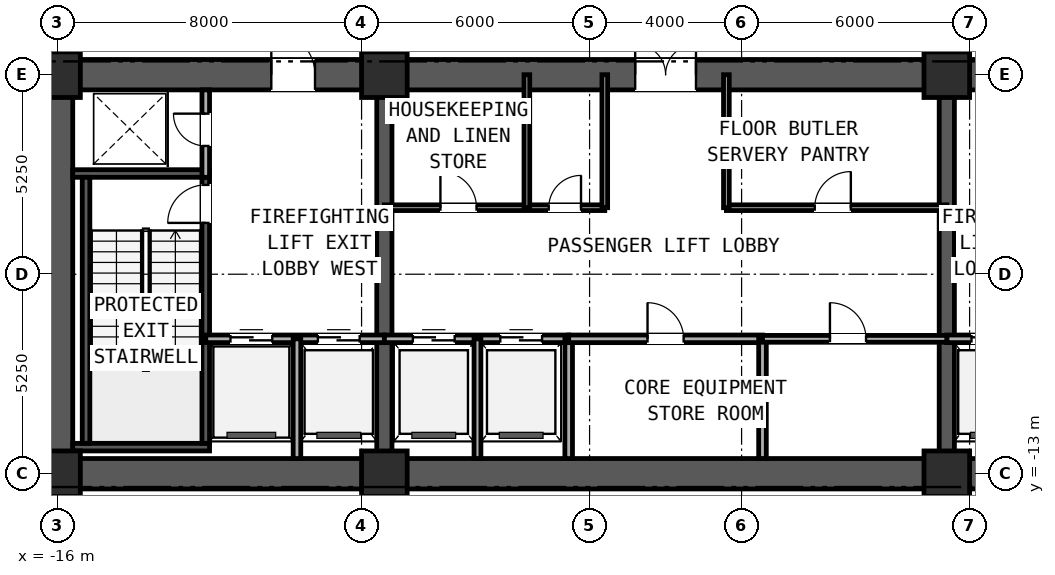
"""IFC4 building model, lengths in metres.
Left out: names, types, materials, properties, quantities, classifications, styles, units other than length and angle.
Written with IfcOpenShell. Run it as: python <this file> out.ifc"""

import sys

from ifc_helpers import new_model, si_unit, direction, frame, frame_2d, origin, origin_2d, place, context, subcontext, project, spatial, rectangle, extrude, element, fill, save


model = new_model("IFC4")
c1 = context("Model", 3, precision=1e-05, world=origin(), true_north=direction((0.0, 1.0)))
c2 = subcontext(c1, "Body", "Model", "MODEL_VIEW")
j1 = project(units=[si_unit("LENGTHUNIT", "METRE"), si_unit("PLANEANGLEUNIT", "RADIAN")], contexts=[c1])
p1 = place(None, origin())
s1 = spatial("IfcSite", under=j1, at=p1, CompositionType="ELEMENT")
p2 = place(p1, origin())
s2 = spatial("IfcBuilding", under=s1, at=p2, CompositionType="ELEMENT")
p3 = place(p2, frame((0.0, 0.0, -5.2)))
s3 = spatial("IfcBuildingStorey", under=s2, at=p3, CompositionType="ELEMENT", Elevation=-5.2)
p4 = place(p3, frame((-16.4, -13.0, 0.0), z_axis=(0.0, 0.0, 1.0), x_axis=(1.0, 0.0, 0.0)))
e1 = element("IfcWall", 1, at=p4, inside=s3, PredefinedType="SHEAR", context=c2, shape_type="SweptSolid", body=[
    extrude(rectangle(XDim=32.8, YDim=0.8, at=frame_2d((16.4, 0.0))), origin(), (0.0, 0.0, 1.0), 4.62),
])
p5 = place(p3, frame((-16.4, -2.5, 0.0), z_axis=(0.0, 0.0, 1.0), x_axis=(1.0, 0.0, 0.0)))
e2 = element("IfcWall", 2, at=p5, inside=s3, PredefinedType="SHEAR", context=c2, shape_type="SweptSolid", body=[
    extrude(rectangle(XDim=32.8, YDim=0.8, at=frame_2d((16.4, 0.0))), origin(), (0.0, 0.0, 1.0), 4.62),
])
p6 = place(p5, frame((6.025, 0.0, 0.0)))
e3 = element("IfcOpeningElement", 3, at=p6, cuts=e2, PredefinedType="OPENING", context=c2, shape_type="SweptSolid", body=[
    extrude(rectangle(XDim=1.15, YDim=2.0, at=frame_2d((0.575, 1.0))), frame((0.0, 0.41, 0.0), z_axis=(0.0, -1.0, 0.0), x_axis=(1.0, 0.0, 0.0)), (0.0, 0.0, 1.0), 0.82),
])
p7 = place(p5, frame((15.6, 0.0, 0.0)))
e4 = element("IfcOpeningElement", 4, at=p7, cuts=e2, PredefinedType="OPENING", context=c2, shape_type="SweptSolid", body=[
    extrude(rectangle(XDim=1.6, YDim=2.0, at=frame_2d((0.8, 1.0))), frame((0.0, 0.41, 0.0), z_axis=(0.0, -1.0, 0.0), x_axis=(1.0, 0.0, 0.0)), (0.0, 0.0, 1.0), 0.82),
])
p8 = place(p5, frame((25.625, 0.0, 0.0)))
e5 = element("IfcOpeningElement", 5, at=p8, cuts=e2, PredefinedType="OPENING", context=c2, shape_type="SweptSolid", body=[
    extrude(rectangle(XDim=1.15, YDim=2.0, at=frame_2d((0.575, 1.0))), frame((0.0, 0.41, 0.0), z_axis=(0.0, -1.0, 0.0), x_axis=(1.0, 0.0, 0.0)), (0.0, 0.0, 1.0), 0.82),
])
p9 = place(p3, frame((-16.0, -12.6, 0.0), z_axis=(0.0, 0.0, 1.0), x_axis=(0.0, 1.0, 0.0)))
e6 = element("IfcWall", 6, at=p9, inside=s3, PredefinedType="SHEAR", context=c2, shape_type="SweptSolid", body=[
    extrude(rectangle(XDim=9.7, YDim=0.8, at=frame_2d((4.85, 0.0))), origin(), (0.0, 0.0, 1.0), 4.62),
])
for number, where, z_axis, x_axis in (
    (7, (-7.4, -12.6, 0.0), (0.0, 0.0, 1.0), (0.0, 1.0, 0.0)),
    (8, (7.4, -12.6, 0.0), (0.0, 0.0, 1.0), (0.0, 1.0, 0.0)),
):
    element("IfcWall", number, at=place(p3, frame(where, z_axis=z_axis, x_axis=x_axis)), inside=s3, PredefinedType="SHEAR", context=c2, shape_type="SweptSolid", body=[
        extrude(rectangle(XDim=9.7, YDim=0.4, at=frame_2d((4.85, 0.0))), origin(), (0.0, 0.0, 1.0), 4.9),
    ])
for number, where, z_axis, x_axis in (
    (9, (-15.6, -12.3, 0.0), (0.0, 0.0, 1.0), (1.0, 0.0, 0.0)),
    (10, (-15.6, -5.1, 0.0), (0.0, 0.0, 1.0), (1.0, 0.0, 0.0)),
):
    element("IfcWall", number, at=place(p3, frame(where, z_axis=z_axis, x_axis=x_axis)), inside=s3, PredefinedType="SOLIDWALL", context=c2, shape_type="SweptSolid", body=[
        extrude(rectangle(XDim=3.6, YDim=0.2, at=frame_2d((1.8, 0.0))), origin(), (0.0, 0.0, 1.0), 4.9),
    ])
p10 = place(p3, frame((-15.25, -12.2, 0.0), z_axis=(0.0, 0.0, 1.0), x_axis=(0.0, 1.0, 0.0)))
e11 = element("IfcWall", 11, at=p10, inside=s3, PredefinedType="SOLIDWALL", context=c2, shape_type="SweptSolid", body=[
    extrude(rectangle(XDim=7.0, YDim=0.2, at=frame_2d((3.5, 0.0))), origin(), (0.0, 0.0, 1.0), 4.9),
])
p11 = place(p3, frame((-12.1, -12.2, 0.0), z_axis=(0.0, 0.0, 1.0), x_axis=(0.0, 1.0, 0.0)))
e12 = element("IfcWall", 12, at=p11, inside=s3, PredefinedType="SOLIDWALL", context=c2, shape_type="SweptSolid", body=[
    extrude(rectangle(XDim=7.0, YDim=0.2, at=frame_2d((3.5, 0.0))), origin(), (0.0, 0.0, 1.0), 4.9),
])
p12 = place(p11, frame((5.8, 0.0, 0.0)))
e13 = element("IfcOpeningElement", 13, at=p12, cuts=e12, PredefinedType="OPENING", context=c2, shape_type="SweptSolid", body=[
    extrude(rectangle(XDim=1.0, YDim=2.1, at=frame_2d((0.5, 1.05))), frame((0.0, 0.11, 0.0), z_axis=(0.0, -1.0, 0.0), x_axis=(1.0, 0.0, 0.0)), (0.0, 0.0, 1.0), 0.22),
])
for number, where, z_axis, x_axis in (
    (14, (-16.0, -13.0, 0.0), (0.0, 0.0, 1.0), (1.0, 0.0, 0.0)),
    (15, (-7.4, -13.0, 0.0), (0.0, 0.0, 1.0), (1.0, 0.0, 0.0)),
    (16, (7.4, -13.0, 0.0), (0.0, 0.0, 1.0), (1.0, 0.0, 0.0)),
    (17, (-16.0, -2.5, 0.0), (0.0, 0.0, 1.0), (1.0, 0.0, 0.0)),
    (18, (-7.4, -2.5, 0.0), (0.0, 0.0, 1.0), (1.0, 0.0, 0.0)),
    (19, (7.4, -2.5, 0.0), (0.0, 0.0, 1.0), (1.0, 0.0, 0.0)),
):
    element("IfcColumn", number, at=place(p3, frame(where, z_axis=z_axis, x_axis=x_axis)), inside=s3, PredefinedType="COLUMN", context=c2, shape_type="SweptSolid", body=[
        extrude(rectangle(XDim=1.2, YDim=1.2, at=origin_2d()), origin(), (0.0, 0.0, 1.0), 5.2),
    ])
p13 = place(p3, frame((-12.1, -5.2, 0.0), z_axis=(0.0, 0.0, 1.0), x_axis=(0.0, 1.0, 0.0)))
e20 = element("IfcWall", 20, at=p13, inside=s3, PredefinedType="PARTITIONING", context=c2, shape_type="SweptSolid", body=[
    extrude(rectangle(XDim=2.3, YDim=0.2, at=frame_2d((1.15, 0.0))), origin(), (0.0, 0.0, 1.0), 4.9),
])
p14 = place(p13, frame((0.825, 0.0, 0.0)))
e21 = element("IfcOpeningElement", 21, at=p14, cuts=e20, PredefinedType="OPENING", context=c2, shape_type="SweptSolid", body=[
    extrude(rectangle(XDim=0.85, YDim=2.05, at=frame_2d((0.425, 1.025))), frame((0.0, 0.11, 0.0), z_axis=(0.0, -1.0, 0.0), x_axis=(1.0, 0.0, 0.0)), (0.0, 0.0, 1.0), 0.22),
])
p15 = place(p3, frame((-12.1, -9.45, 0.0), z_axis=(0.0, 0.0, 1.0), x_axis=(1.0, 0.0, 0.0)))
e22 = element("IfcWall", 22, at=p15, inside=s3, PredefinedType="PARTITIONING", context=c2, shape_type="SweptSolid", body=[
    extrude(rectangle(XDim=4.7, YDim=0.2, at=frame_2d((2.35, 0.0))), origin(), (0.0, 0.0, 1.0), 4.9),
])
p16 = place(p15, frame((0.65, 0.0, 0.0)))
e23 = element("IfcOpeningElement", 23, at=p16, cuts=e22, PredefinedType="OPENING", context=c2, shape_type="SweptSolid", body=[
    extrude(rectangle(XDim=1.1, YDim=2.2, at=frame_2d((0.55, 1.1))), frame((0.0, 0.11, 0.0), z_axis=(0.0, -1.0, 0.0), x_axis=(1.0, 0.0, 0.0)), (0.0, 0.0, 1.0), 0.22),
])
p17 = place(p15, frame((2.95, 0.0, 0.0)))
e24 = element("IfcOpeningElement", 24, at=p17, cuts=e22, PredefinedType="OPENING", context=c2, shape_type="SweptSolid", body=[
    extrude(rectangle(XDim=1.1, YDim=2.2, at=frame_2d((0.55, 1.1))), frame((0.0, 0.11, 0.0), z_axis=(0.0, -1.0, 0.0), x_axis=(1.0, 0.0, 0.0)), (0.0, 0.0, 1.0), 0.22),
])
p18 = place(p3, frame((-9.7, -12.6, 0.0), z_axis=(0.0, 0.0, 1.0), x_axis=(0.0, 1.0, 0.0)))
e25 = element("IfcWall", 25, at=p18, inside=s3, PredefinedType="PARTITIONING", context=c2, shape_type="SweptSolid", body=[
    extrude(rectangle(XDim=3.15, YDim=0.2, at=frame_2d((1.575, 0.0))), origin(), (0.0, 0.0, 1.0), 4.9),
])
p19 = place(p3, frame((7.4, -9.45, 0.0), z_axis=(0.0, 0.0, 1.0), x_axis=(1.0, 0.0, 0.0)))
e26 = element("IfcWall", 26, at=p19, inside=s3, PredefinedType="PARTITIONING", context=c2, shape_type="SweptSolid", body=[
    extrude(rectangle(XDim=4.7, YDim=0.2, at=frame_2d((2.35, 0.0))), origin(), (0.0, 0.0, 1.0), 4.9),
])
p20 = place(p19, frame((2.95, 0.0, 0.0)))
e27 = element("IfcOpeningElement", 27, at=p20, cuts=e26, PredefinedType="OPENING", context=c2, shape_type="SweptSolid", body=[
    extrude(rectangle(XDim=1.1, YDim=2.2, at=frame_2d((0.55, 1.1))), frame((0.0, 0.11, 0.0), z_axis=(0.0, -1.0, 0.0), x_axis=(1.0, 0.0, 0.0)), (0.0, 0.0, 1.0), 0.22),
])
p21 = place(p19, frame((0.65, 0.0, 0.0)))
e28 = element("IfcOpeningElement", 28, at=p21, cuts=e26, PredefinedType="OPENING", context=c2, shape_type="SweptSolid", body=[
    extrude(rectangle(XDim=1.1, YDim=2.2, at=frame_2d((0.55, 1.1))), frame((0.0, 0.11, 0.0), z_axis=(0.0, -1.0, 0.0), x_axis=(1.0, 0.0, 0.0)), (0.0, 0.0, 1.0), 0.22),
])
p22 = place(p3, frame((-7.4, -9.45, 0.0), z_axis=(0.0, 0.0, 1.0), x_axis=(1.0, 0.0, 0.0)))
e29 = element("IfcWall", 29, at=p22, inside=s3, PredefinedType="PARTITIONING", context=c2, shape_type="SweptSolid", body=[
    extrude(rectangle(XDim=4.85, YDim=0.2, at=frame_2d((2.425, 0.0))), origin(), (0.0, 0.0, 1.0), 4.9),
])
p23 = place(p22, frame((0.75, 0.0, 0.0)))
e30 = element("IfcOpeningElement", 30, at=p23, cuts=e29, PredefinedType="OPENING", context=c2, shape_type="SweptSolid", body=[
    extrude(rectangle(XDim=1.1, YDim=2.2, at=frame_2d((0.55, 1.1))), frame((0.0, 0.11, 0.0), z_axis=(0.0, -1.0, 0.0), x_axis=(1.0, 0.0, 0.0)), (0.0, 0.0, 1.0), 0.22),
])
p24 = place(p22, frame((3.05, 0.0, 0.0)))
e31 = element("IfcOpeningElement", 31, at=p24, cuts=e29, PredefinedType="OPENING", context=c2, shape_type="SweptSolid", body=[
    extrude(rectangle(XDim=1.1, YDim=2.2, at=frame_2d((0.55, 1.1))), frame((0.0, 0.11, 0.0), z_axis=(0.0, -1.0, 0.0), x_axis=(1.0, 0.0, 0.0)), (0.0, 0.0, 1.0), 0.22),
])
p25 = place(p3, frame((-4.95, -12.6, 0.0), z_axis=(0.0, 0.0, 1.0), x_axis=(0.0, 1.0, 0.0)))
e32 = element("IfcWall", 32, at=p25, inside=s3, PredefinedType="PARTITIONING", context=c2, shape_type="SweptSolid", body=[
    extrude(rectangle(XDim=3.15, YDim=0.18, at=frame_2d((1.575, 0.0))), origin(), (0.0, 0.0, 1.0), 4.9),
])
p26 = place(p3, frame((-2.55, -12.6, 0.0), z_axis=(0.0, 0.0, 1.0), x_axis=(0.0, 1.0, 0.0)))
e33 = element("IfcWall", 33, at=p26, inside=s3, PredefinedType="PARTITIONING", context=c2, shape_type="SweptSolid", body=[
    extrude(rectangle(XDim=3.15, YDim=0.2, at=frame_2d((1.575, 0.0))), origin(), (0.0, 0.0, 1.0), 4.9),
])
p27 = place(p3, frame((-2.55, -9.45, 0.0), z_axis=(0.0, 0.0, 1.0), x_axis=(1.0, 0.0, 0.0)))
e34 = element("IfcWall", 34, at=p27, inside=s3, PredefinedType="PARTITIONING", context=c2, shape_type="SweptSolid", body=[
    extrude(rectangle(XDim=5.1, YDim=0.2, at=frame_2d((2.55, 0.0))), origin(), (0.0, 0.0, 1.0), 4.9),
])
p28 = place(p27, frame((2.075, 0.0, 0.0)))
e35 = element("IfcOpeningElement", 35, at=p28, cuts=e34, PredefinedType="OPENING", context=c2, shape_type="SweptSolid", body=[
    extrude(rectangle(XDim=0.95, YDim=2.15, at=frame_2d((0.475, 1.075))), frame((0.0, 0.11, 0.0), z_axis=(0.0, -1.0, 0.0), x_axis=(1.0, 0.0, 0.0)), (0.0, 0.0, 1.0), 0.22),
])
p29 = place(p3, frame((2.55, -12.6, 0.0), z_axis=(0.0, 0.0, 1.0), x_axis=(0.0, 1.0, 0.0)))
e36 = element("IfcWall", 36, at=p29, inside=s3, PredefinedType="PARTITIONING", context=c2, shape_type="SweptSolid", body=[
    extrude(rectangle(XDim=3.15, YDim=0.2, at=frame_2d((1.575, 0.0))), origin(), (0.0, 0.0, 1.0), 4.9),
])
p30 = place(p3, frame((2.55, -9.45, 0.0), z_axis=(0.0, 0.0, 1.0), x_axis=(1.0, 0.0, 0.0)))
e37 = element("IfcWall", 37, at=p30, inside=s3, PredefinedType="PARTITIONING", context=c2, shape_type="SweptSolid", body=[
    extrude(rectangle(XDim=4.85, YDim=0.18, at=frame_2d((2.425, 0.0))), origin(), (0.0, 0.0, 1.0), 4.9),
])
p31 = place(p30, frame((1.775, 0.0, 0.0)))
e38 = element("IfcOpeningElement", 38, at=p31, cuts=e37, PredefinedType="OPENING", context=c2, shape_type="SweptSolid", body=[
    extrude(rectangle(XDim=0.95, YDim=2.15, at=frame_2d((0.475, 1.075))), frame((0.0, 0.1, 0.0), z_axis=(0.0, -1.0, 0.0), x_axis=(1.0, 0.0, 0.0)), (0.0, 0.0, 1.0), 0.2),
])
p32 = place(p3, frame((-7.4, -6.0, 0.0), z_axis=(0.0, 0.0, 1.0), x_axis=(1.0, 0.0, 0.0)))
e39 = element("IfcWall", 39, at=p32, inside=s3, PredefinedType="PARTITIONING", context=c2, shape_type="SweptSolid", body=[
    extrude(rectangle(XDim=5.8, YDim=0.15, at=frame_2d((2.9, 0.0))), origin(), (0.0, 0.0, 1.0), 4.9),
])
p33 = place(p32, frame((1.475, 0.0, 0.0)))
e40 = element("IfcOpeningElement", 40, at=p33, cuts=e39, PredefinedType="OPENING", context=c2, shape_type="SweptSolid", body=[
    extrude(rectangle(XDim=0.95, YDim=2.15, at=frame_2d((0.475, 1.075))), frame((0.0, 0.085, 0.0), z_axis=(0.0, -1.0, 0.0), x_axis=(1.0, 0.0, 0.0)), (0.0, 0.0, 1.0), 0.17),
])
p34 = place(p32, frame((4.325, 0.0, 0.0)))
e41 = element("IfcOpeningElement", 41, at=p34, cuts=e39, PredefinedType="OPENING", context=c2, shape_type="SweptSolid", body=[
    extrude(rectangle(XDim=0.85, YDim=2.05, at=frame_2d((0.425, 1.025))), frame((0.0, 0.085, 0.0), z_axis=(0.0, -1.0, 0.0), x_axis=(1.0, 0.0, 0.0)), (0.0, 0.0, 1.0), 0.17),
])
p35 = place(p3, frame((-1.6, -6.0, 0.0), z_axis=(0.0, 0.0, 1.0), x_axis=(0.0, 1.0, 0.0)))
e42 = element("IfcWall", 42, at=p35, inside=s3, PredefinedType="PARTITIONING", context=c2, shape_type="SweptSolid", body=[
    extrude(rectangle(XDim=3.5, YDim=0.15, at=frame_2d((1.75, 0.0))), origin(), (0.0, 0.0, 1.0), 4.03),
])
p36 = place(p3, frame((1.6, -6.0, 0.0), z_axis=(0.0, 0.0, 1.0), x_axis=(1.0, 0.0, 0.0)))
e43 = element("IfcWall", 43, at=p36, inside=s3, PredefinedType="PARTITIONING", context=c2, shape_type="SweptSolid", body=[
    extrude(rectangle(XDim=5.8, YDim=0.15, at=frame_2d((2.9, 0.0))), origin(), (0.0, 0.0, 1.0), 4.9),
])
p37 = place(p36, frame((2.325, 0.0, 0.0)))
e44 = element("IfcOpeningElement", 44, at=p37, cuts=e43, PredefinedType="OPENING", context=c2, shape_type="SweptSolid", body=[
    extrude(rectangle(XDim=0.95, YDim=2.15, at=frame_2d((0.475, 1.075))), frame((0.0, 0.085, 0.0), z_axis=(0.0, -1.0, 0.0), x_axis=(1.0, 0.0, 0.0)), (0.0, 0.0, 1.0), 0.17),
])
for number, where, z_axis, x_axis in (
    (45, (1.6, -6.0, 0.0), (0.0, 0.0, 1.0), (0.0, 1.0, 0.0)),
    (46, (-3.65, -6.0, 0.0), (0.0, 0.0, 1.0), (0.0, 1.0, 0.0)),
):
    element("IfcWall", number, at=place(p3, frame(where, z_axis=z_axis, x_axis=x_axis)), inside=s3, PredefinedType="PARTITIONING", context=c2, shape_type="SweptSolid", body=[
        extrude(rectangle(XDim=3.5, YDim=0.15, at=frame_2d((1.75, 0.0))), origin(), (0.0, 0.0, 1.0), 4.03),
    ])
p38 = place(p3, frame((-26.75, -2.15, 0.0), z_axis=(0.0, 0.0, 1.0), x_axis=(1.0, 0.0, 0.0)))
e47 = element("IfcWall", 47, at=p38, inside=s3, PredefinedType="PARTITIONING", context=c2, shape_type="SweptSolid", body=[
    extrude(rectangle(XDim=10.75, YDim=0.2, at=frame_2d((5.375, 0.0))), origin(), (0.0, 0.0, 1.0), 4.03),
])
p39 = place(p38, frame((2.675, 0.0, 0.0)))
e48 = element("IfcOpeningElement", 48, at=p39, cuts=e47, PredefinedType="OPENING", context=c2, shape_type="SweptSolid", body=[
    extrude(rectangle(XDim=1.15, YDim=2.2, at=frame_2d((0.575, 1.1))), frame((0.0, 0.11, 0.0), z_axis=(0.0, -1.0, 0.0), x_axis=(1.0, 0.0, 0.0)), (0.0, 0.0, 1.0), 0.22),
])
p40 = place(p12, frame((1.0, 0.0, 0.0), z_axis=(0.0, 0.0, 1.0), x_axis=(-1.0, 0.0, 0.0)))
e49 = element("IfcDoor", 49, at=p40, inside=s3, OperationType="SINGLE_SWING_LEFT", PredefinedType="DOOR", context=c2, shape_type="SweptSolid", body=[
    extrude(rectangle(XDim=1.0, YDim=2.1, at=frame_2d((0.5, 1.05))), frame((0.0, 0.025, 0.0), z_axis=(0.0, -1.0, 0.0), x_axis=(1.0, 0.0, 0.0)), (0.0, 0.0, 1.0), 0.05),
])
fill(e13, e49)
p41 = place(p14, origin())
e50 = element("IfcDoor", 50, at=p41, inside=s3, OperationType="SINGLE_SWING_RIGHT", PredefinedType="DOOR", context=c2, shape_type="SweptSolid", body=[
    extrude(rectangle(XDim=0.85, YDim=2.05, at=frame_2d((0.425, 1.025))), frame((0.0, 0.025, 0.0), z_axis=(0.0, -1.0, 0.0), x_axis=(1.0, 0.0, 0.0)), (0.0, 0.0, 1.0), 0.05),
])
fill(e21, e50)
p42 = place(p16, origin())
e51 = element("IfcDoor", 51, at=p42, inside=s3, OperationType="SLIDING_TO_LEFT", PredefinedType="DOOR", context=c2, shape_type="SweptSolid", body=[
    extrude(rectangle(XDim=1.1, YDim=2.2, at=frame_2d((0.55, 1.1))), frame((0.0, 0.025, 0.0), z_axis=(0.0, -1.0, 0.0), x_axis=(1.0, 0.0, 0.0)), (0.0, 0.0, 1.0), 0.05),
])
fill(e23, e51)
p43 = place(p17, origin())
e52 = element("IfcDoor", 52, at=p43, inside=s3, OperationType="SLIDING_TO_RIGHT", PredefinedType="DOOR", context=c2, shape_type="SweptSolid", body=[
    extrude(rectangle(XDim=1.1, YDim=2.2, at=frame_2d((0.55, 1.1))), frame((0.0, 0.025, 0.0), z_axis=(0.0, -1.0, 0.0), x_axis=(1.0, 0.0, 0.0)), (0.0, 0.0, 1.0), 0.05),
])
fill(e24, e52)
p44 = place(p21, origin())
e53 = element("IfcDoor", 53, at=p44, inside=s3, OperationType="SLIDING_TO_RIGHT", PredefinedType="DOOR", context=c2, shape_type="SweptSolid", body=[
    extrude(rectangle(XDim=1.1, YDim=2.2, at=frame_2d((0.55, 1.1))), frame((0.0, 0.025, 0.0), z_axis=(0.0, -1.0, 0.0), x_axis=(1.0, 0.0, 0.0)), (0.0, 0.0, 1.0), 0.05),
])
fill(e28, e53)
p45 = place(p6, origin())
e54 = element("IfcDoor", 54, at=p45, inside=s3, OperationType="SINGLE_SWING_LEFT", PredefinedType="DOOR", context=c2, shape_type="SweptSolid", body=[
    extrude(rectangle(XDim=1.15, YDim=2.0, at=frame_2d((0.575, 1.0))), frame((0.0, 0.025, 0.0), z_axis=(0.0, -1.0, 0.0), x_axis=(1.0, 0.0, 0.0)), (0.0, 0.0, 1.0), 0.05),
])
fill(e3, e54)
p46 = place(p7, origin())
e55 = element("IfcDoor", 55, at=p46, inside=s3, OperationType="DOUBLE_DOOR_SINGLE_SWING", PredefinedType="DOOR", context=c2, shape_type="SweptSolid", body=[
    extrude(rectangle(XDim=1.6, YDim=2.0, at=frame_2d((0.8, 1.0))), frame((0.0, 0.025, 0.0), z_axis=(0.0, -1.0, 0.0), x_axis=(1.0, 0.0, 0.0)), (0.0, 0.0, 1.0), 0.05),
])
fill(e4, e55)
p47 = place(p23, origin())
e56 = element("IfcDoor", 56, at=p47, inside=s3, OperationType="SLIDING_TO_LEFT", PredefinedType="DOOR", context=c2, shape_type="SweptSolid", body=[
    extrude(rectangle(XDim=1.1, YDim=2.2, at=frame_2d((0.55, 1.1))), frame((0.0, 0.025, 0.0), z_axis=(0.0, -1.0, 0.0), x_axis=(1.0, 0.0, 0.0)), (0.0, 0.0, 1.0), 0.05),
])
fill(e30, e56)
p48 = place(p24, origin())
e57 = element("IfcDoor", 57, at=p48, inside=s3, OperationType="SLIDING_TO_LEFT", PredefinedType="DOOR", context=c2, shape_type="SweptSolid", body=[
    extrude(rectangle(XDim=1.1, YDim=2.2, at=frame_2d((0.55, 1.1))), frame((0.0, 0.025, 0.0), z_axis=(0.0, -1.0, 0.0), x_axis=(1.0, 0.0, 0.0)), (0.0, 0.0, 1.0), 0.05),
])
fill(e31, e57)
p49 = place(p28, origin())
e58 = element("IfcDoor", 58, at=p49, inside=s3, OperationType="SINGLE_SWING_LEFT", PredefinedType="DOOR", context=c2, shape_type="SweptSolid", body=[
    extrude(rectangle(XDim=0.95, YDim=2.15, at=frame_2d((0.475, 1.075))), frame((0.0, 0.025, 0.0), z_axis=(0.0, -1.0, 0.0), x_axis=(1.0, 0.0, 0.0)), (0.0, 0.0, 1.0), 0.05),
])
fill(e35, e58)
p50 = place(p31, origin())
e59 = element("IfcDoor", 59, at=p50, inside=s3, OperationType="SINGLE_SWING_LEFT", PredefinedType="DOOR", context=c2, shape_type="SweptSolid", body=[
    extrude(rectangle(XDim=0.95, YDim=2.15, at=frame_2d((0.475, 1.075))), frame((0.0, 0.025, 0.0), z_axis=(0.0, -1.0, 0.0), x_axis=(1.0, 0.0, 0.0)), (0.0, 0.0, 1.0), 0.05),
])
fill(e38, e59)
p51 = place(p33, frame((0.95, 0.0, 0.0), z_axis=(0.0, 0.0, 1.0), x_axis=(-1.0, 0.0, 0.0)))
e60 = element("IfcDoor", 60, at=p51, inside=s3, OperationType="SINGLE_SWING_LEFT", PredefinedType="DOOR", context=c2, shape_type="SweptSolid", body=[
    extrude(rectangle(XDim=0.95, YDim=2.15, at=frame_2d((0.475, 1.075))), frame((0.0, 0.025, 0.0), z_axis=(0.0, -1.0, 0.0), x_axis=(1.0, 0.0, 0.0)), (0.0, 0.0, 1.0), 0.05),
])
fill(e40, e60)
p52 = place(p34, frame((0.85, 0.0, 0.0), z_axis=(0.0, 0.0, 1.0), x_axis=(-1.0, 0.0, 0.0)))
e61 = element("IfcDoor", 61, at=p52, inside=s3, OperationType="SINGLE_SWING_RIGHT", PredefinedType="DOOR", context=c2, shape_type="SweptSolid", body=[
    extrude(rectangle(XDim=0.85, YDim=2.05, at=frame_2d((0.425, 1.025))), frame((0.0, 0.025, 0.0), z_axis=(0.0, -1.0, 0.0), x_axis=(1.0, 0.0, 0.0)), (0.0, 0.0, 1.0), 0.05),
])
fill(e41, e61)
p53 = place(p37, frame((0.95, 0.0, 0.0), z_axis=(0.0, 0.0, 1.0), x_axis=(-1.0, 0.0, 0.0)))
e62 = element("IfcDoor", 62, at=p53, inside=s3, OperationType="SINGLE_SWING_RIGHT", PredefinedType="DOOR", context=c2, shape_type="SweptSolid", body=[
    extrude(rectangle(XDim=0.95, YDim=2.15, at=frame_2d((0.475, 1.075))), frame((0.0, 0.025, 0.0), z_axis=(0.0, -1.0, 0.0), x_axis=(1.0, 0.0, 0.0)), (0.0, 0.0, 1.0), 0.05),
])
fill(e44, e62)
save(model, sys.argv[1])
